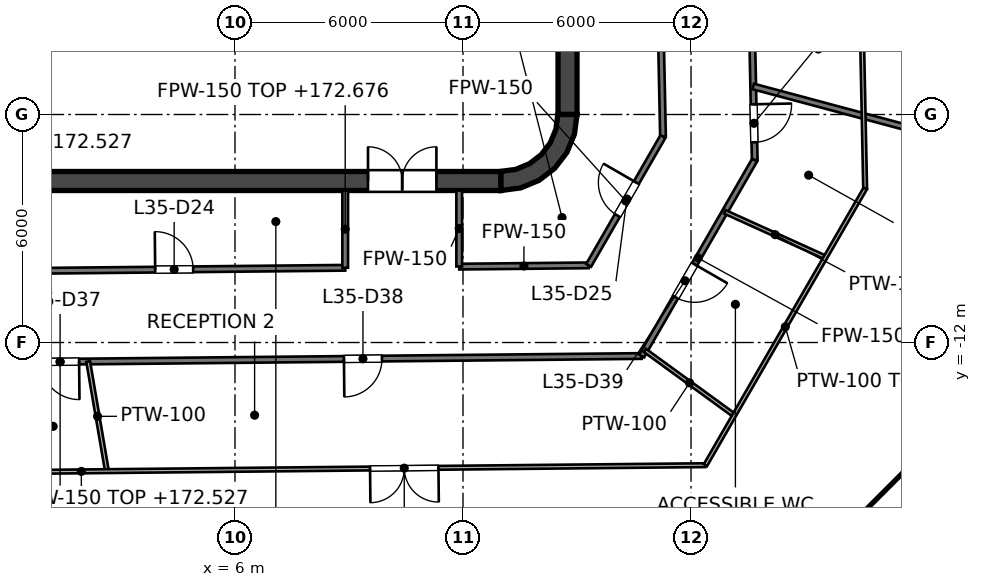
"""IFC4 building model, lengths in metres.
Left out: names, types, materials, properties, quantities, classifications, styles, units other than length and angle.
Written with IfcOpenShell. Run it as: python <this file> out.ifc"""

import sys

from ifc_helpers import new_model, si_unit, direction, frame, frame_2d, origin, place, context, subcontext, project, spatial, polyline, rectangle, outline, extrude, element, fill, save


model = new_model("IFC4")
c1 = context("Model", 3, precision=1e-05, world=origin(), true_north=direction((0.0, 1.0)))
c2 = subcontext(c1, "Body", "Model", "MODEL_VIEW")
j1 = project(units=[si_unit("LENGTHUNIT", "METRE"), si_unit("PLANEANGLEUNIT", "RADIAN")], contexts=[c1])
p1 = place(None, origin())
s1 = spatial("IfcSite", under=j1, at=p1, CompositionType="ELEMENT")
p2 = place(p1, origin())
s2 = spatial("IfcBuilding", under=s1, at=p2, CompositionType="ELEMENT")
p3 = place(p2, frame((0.0, 0.0, 169.6)))
s3 = spatial("IfcBuildingStorey", under=s2, at=p3, CompositionType="ELEMENT", Elevation=169.6)
p4 = place(p3, frame((-13.0, -7.75, 0.0), z_axis=(0.0, 0.0, 1.0), x_axis=(1.0, 0.0, 0.0)))
e1 = element("IfcWall", 1, at=p4, inside=s3, PredefinedType="SHEAR", context=c2, shape_type="SweptSolid", body=[
    extrude(rectangle(XDim=26.0, YDim=0.5, at=frame_2d((13.0, 0.0))), origin(), (0.0, 0.0, 1.0), 4.0),
])
p5 = place(p4, frame((1.7, 0.0, 0.0)))
e2 = element("IfcOpeningElement", 2, at=p5, cuts=e1, PredefinedType="OPENING", context=c2, shape_type="SweptSolid", body=[
    extrude(rectangle(XDim=1.8, YDim=2.1, at=frame_2d((0.9, 1.05))), frame((0.0, 0.25, 0.0), z_axis=(0.0, -1.0, 0.0), x_axis=(1.0, 0.0, 0.0)), (0.0, 0.0, 1.0), 0.5),
])
p6 = place(p4, frame((22.5, 0.0, 0.0)))
e3 = element("IfcOpeningElement", 3, at=p6, cuts=e1, PredefinedType="OPENING", context=c2, shape_type="SweptSolid", body=[
    extrude(rectangle(XDim=1.8, YDim=2.1, at=frame_2d((0.9, 1.05))), frame((0.0, 0.25, 0.0), z_axis=(0.0, -1.0, 0.0), x_axis=(1.0, 0.0, 0.0)), (0.0, 0.0, 1.0), 0.5),
])
p7 = place(p3, frame((14.75, -6.0, 0.0), z_axis=(0.0, 0.0, 1.0), x_axis=(0.0, 1.0, 0.0)))
e4 = element("IfcWall", 4, at=p7, inside=s3, PredefinedType="SHEAR", context=c2, shape_type="SweptSolid", body=[
    extrude(rectangle(XDim=12.0, YDim=0.5, at=frame_2d((6.0, 0.0))), origin(), (0.0, 0.0, 1.0), 4.0),
])
p8 = place(p3, origin())
e5 = element("IfcWall", 5, at=p8, inside=s3, PredefinedType="SHEAR", context=c2, shape_type="SweptSolid", body=[
    extrude(outline(polyline([(15.0, -6.0), (14.496, -6.0), (14.445, -6.387), (14.295, -6.748), (14.058, -7.058), (13.748, -7.295), (13.387, -7.445), (13.0, -7.496), (13.0, -8.0), (13.518, -7.932), (14.0, -7.732), (14.414, -7.414), (14.732, -7.0), (14.932, -6.518), (15.0, -6.0)])), origin(), (0.0, 0.0, 1.0), 4.0),
])
p9 = place(p3, frame((9.0, -6.6, 0.0), z_axis=(0.0, 0.0, 1.0), x_axis=(0.0, 1.0, 0.0)))
e6 = element("IfcWall", 6, at=p9, inside=s3, PredefinedType="SOLIDWALL", context=c2, shape_type="SweptSolid", body=[
    extrude(rectangle(XDim=2.5, YDim=0.25, at=frame_2d((1.25, 0.0))), origin(), (0.0, 0.0, 1.0), 3.85),
])
p10 = place(p9, frame((0.65, 0.0, 0.0)))
e7 = element("IfcOpeningElement", 7, at=p10, cuts=e6, PredefinedType="OPENING", context=c2, shape_type="SweptSolid", body=[
    extrude(rectangle(XDim=1.2, YDim=2.1, at=frame_2d((0.6, 1.05))), frame((0.0, 0.125, 0.0), z_axis=(0.0, -1.0, 0.0), x_axis=(1.0, 0.0, 0.0)), (0.0, 0.0, 1.0), 0.25),
])
p11 = place(p3, frame((3.15, -6.6, 0.0), z_axis=(0.0, 0.0, 1.0), x_axis=(0.0, 1.0, 0.0)))
e8 = element("IfcWall", 8, at=p11, inside=s3, PredefinedType="SOLIDWALL", context=c2, shape_type="SweptSolid", body=[
    extrude(rectangle(XDim=2.5, YDim=0.25, at=frame_2d((1.25, 0.0))), origin(), (0.0, 0.0, 1.0), 3.85),
])
p12 = place(p3, frame((-9.125, -7.05, 0.0), z_axis=(0.0, 0.0, 1.0), x_axis=(1.0, 0.0, 0.0)))
e9 = element("IfcWall", 9, at=p12, inside=s3, PredefinedType="SOLIDWALL", context=c2, shape_type="SweptSolid", body=[
    extrude(rectangle(XDim=18.25, YDim=0.9, at=frame_2d((9.125, 0.0))), origin(), (0.0, 0.0, 1.0), 3.85),
])
p13 = place(p3, frame((11.8, -7.5, 0.0), z_axis=(0.0, 0.0, 1.0), x_axis=(0.0, 1.0, 0.0)))
e10 = element("IfcWall", 10, at=p13, inside=s3, PredefinedType="SOLIDWALL", context=c2, shape_type="SweptSolid", body=[
    extrude(rectangle(XDim=15.0, YDim=0.4, at=frame_2d((7.5, 0.0))), origin(), (0.0, 0.0, 1.0), 3.85),
])
p14 = place(p13, frame((11.3, 0.0, 0.0)))
e11 = element("IfcOpeningElement", 11, at=p14, cuts=e10, PredefinedType="OPENING", context=c2, shape_type="SweptSolid", body=[
    extrude(rectangle(XDim=1.1, YDim=2.1, at=frame_2d((0.55, 1.05))), frame((0.0, 0.2, 0.0), z_axis=(0.0, -1.0, 0.0), x_axis=(1.0, 0.0, 0.0)), (0.0, 0.0, 1.0), 0.4),
])
p15 = place(p13, frame((8.4, 0.0, 0.0)))
e12 = element("IfcOpeningElement", 12, at=p15, cuts=e10, PredefinedType="OPENING", context=c2, shape_type="SweptSolid", body=[
    extrude(rectangle(XDim=1.1, YDim=2.1, at=frame_2d((0.55, 1.05))), frame((0.0, 0.2, 0.0), z_axis=(0.0, -1.0, 0.0), x_axis=(1.0, 0.0, 0.0)), (0.0, 0.0, 1.0), 0.4),
])
p16 = place(p13, frame((5.5, 0.0, 0.0)))
e13 = element("IfcOpeningElement", 13, at=p16, cuts=e10, PredefinedType="OPENING", context=c2, shape_type="SweptSolid", body=[
    extrude(rectangle(XDim=1.1, YDim=2.1, at=frame_2d((0.55, 1.05))), frame((0.0, 0.2, 0.0), z_axis=(0.0, -1.0, 0.0), x_axis=(1.0, 0.0, 0.0)), (0.0, 0.0, 1.0), 0.4),
])
p17 = place(p13, frame((13.697, 0.0, 0.0)))
e14 = element("IfcOpeningElement", 14, at=p17, cuts=e10, PredefinedType="OPENING", context=c2, shape_type="SweptSolid", body=[
    extrude(rectangle(XDim=0.9, YDim=2.1, at=frame_2d((0.45, 1.05))), frame((0.0, 0.2, 0.0), z_axis=(0.0, -1.0, 0.0), x_axis=(1.0, 0.0, 0.0)), (0.0, 0.0, 1.0), 0.4),
])
p18 = place(p13, frame((0.403, 0.0, 0.0)))
e15 = element("IfcOpeningElement", 15, at=p18, cuts=e10, PredefinedType="OPENING", context=c2, shape_type="SweptSolid", body=[
    extrude(rectangle(XDim=0.9, YDim=2.1, at=frame_2d((0.45, 1.05))), frame((0.0, 0.2, 0.0), z_axis=(0.0, -1.0, 0.0), x_axis=(1.0, 0.0, 0.0)), (0.0, 0.0, 1.0), 0.4),
])
e16 = element("IfcWall", 16, at=p8, inside=s3, PredefinedType="SOLIDWALL", context=c2, shape_type="SweptSolid", body=[
    extrude(outline(polyline([(12.0, -5.675), (12.0, -5.925), (14.25, -5.925), (14.5, -5.925), (14.5, -5.675), (14.5, -3.025), (14.5, -2.775), (14.5, -0.125), (14.5, 0.125), (14.5, 2.775), (14.5, 3.025), (14.5, 5.675), (14.5, 5.925), (14.25, 5.925), (12.0, 5.925), (12.0, 5.675), (14.25, 5.675), (14.25, 3.025), (12.0, 3.025), (12.0, 2.775), (14.25, 2.775), (14.25, 0.125), (12.0, 0.125), (12.0, -0.125), (14.25, -0.125), (14.25, -2.775), (12.0, -2.775), (12.0, -3.025), (14.25, -3.025), (14.25, -5.675), (12.0, -5.675)])), origin(), (0.0, 0.0, 1.0), 3.85),
])
p19 = place(p3, frame((16.955, 8.314, 0.0), z_axis=(0.0, 0.0, 1.0), x_axis=(0.020631568882, -0.999787146529, 0.0)))
e17 = element("IfcWall", 17, at=p19, inside=s3, PredefinedType="PARTITIONING", context=c2, shape_type="SweptSolid", body=[
    extrude(rectangle(XDim=14.898, YDim=0.15, at=frame_2d((7.449, 0.0))), origin(), (0.0, 0.0, 1.0), 2.927),
])
p20 = place(p19, frame((6.949, 0.0, 0.0)))
e18 = element("IfcOpeningElement", 18, at=p20, cuts=e17, PredefinedType="OPENING", context=c2, shape_type="SweptSolid", body=[
    extrude(rectangle(XDim=1.0, YDim=2.1, at=frame_2d((0.5, 1.05))), frame((0.0, 0.075, 0.0), z_axis=(0.0, -1.0, 0.0), x_axis=(1.0, 0.0, 0.0)), (0.0, 0.0, 1.0), 0.15),
])
p21 = place(p19, frame((1.514, 0.0, 0.0)))
e19 = element("IfcOpeningElement", 19, at=p21, cuts=e17, PredefinedType="OPENING", context=c2, shape_type="SweptSolid", body=[
    extrude(rectangle(XDim=1.0, YDim=2.1, at=frame_2d((0.5, 1.05))), frame((0.0, 0.075, 0.0), z_axis=(0.0, -1.0, 0.0), x_axis=(1.0, 0.0, 0.0)), (0.0, 0.0, 1.0), 0.15),
])
p22 = place(p3, frame((19.327, 9.716, 0.0), z_axis=(0.0, 0.0, 1.0), x_axis=(0.020632909715, -0.999787118859, 0.0)))
e20 = element("IfcWall", 20, at=p22, inside=s3, PredefinedType="PARTITIONING", context=c2, shape_type="SweptSolid", body=[
    extrude(rectangle(XDim=16.921, YDim=0.15, at=frame_2d((8.46, 0.0))), origin(), (0.0, 0.0, 1.0), 2.927),
])
p23 = place(p22, frame((15.451, 0.0, 0.0)))
e21 = element("IfcOpeningElement", 21, at=p23, cuts=e20, PredefinedType="OPENING", context=c2, shape_type="SweptSolid", body=[
    extrude(rectangle(XDim=1.0, YDim=2.1, at=frame_2d((0.5, 1.05))), frame((0.0, 0.075, 0.0), z_axis=(0.0, -1.0, 0.0), x_axis=(1.0, 0.0, 0.0)), (0.0, 0.0, 1.0), 0.15),
])
p24 = place(p22, frame((12.819, 0.0, 0.0)))
e22 = element("IfcOpeningElement", 22, at=p24, cuts=e20, PredefinedType="OPENING", context=c2, shape_type="SweptSolid", body=[
    extrude(rectangle(XDim=1.0, YDim=2.1, at=frame_2d((0.5, 1.05))), frame((0.0, 0.075, 0.0), z_axis=(0.0, -1.0, 0.0), x_axis=(1.0, 0.0, 0.0)), (0.0, 0.0, 1.0), 0.15),
])
p25 = place(p22, frame((9.226, 0.0, 0.0)))
e23 = element("IfcOpeningElement", 23, at=p25, cuts=e20, PredefinedType="OPENING", context=c2, shape_type="SweptSolid", body=[
    extrude(rectangle(XDim=1.0, YDim=2.1, at=frame_2d((0.5, 1.05))), frame((0.0, 0.075, 0.0), z_axis=(0.0, -1.0, 0.0), x_axis=(1.0, 0.0, 0.0)), (0.0, 0.0, 1.0), 0.15),
])
p26 = place(p22, frame((5.762, 0.0, 0.0)))
e24 = element("IfcOpeningElement", 24, at=p26, cuts=e20, PredefinedType="OPENING", context=c2, shape_type="SweptSolid", body=[
    extrude(rectangle(XDim=1.0, YDim=2.1, at=frame_2d((0.5, 1.05))), frame((0.0, 0.075, 0.0), z_axis=(0.0, -1.0, 0.0), x_axis=(1.0, 0.0, 0.0)), (0.0, 0.0, 1.0), 0.15),
])
p27 = place(p22, frame((1.706, 0.0, 0.0)))
e25 = element("IfcOpeningElement", 25, at=p27, cuts=e20, PredefinedType="OPENING", context=c2, shape_type="SweptSolid", body=[
    extrude(rectangle(XDim=1.0, YDim=2.1, at=frame_2d((0.5, 1.05))), frame((0.0, 0.075, 0.0), z_axis=(0.0, -1.0, 0.0), x_axis=(1.0, 0.0, 0.0)), (0.0, 0.0, 1.0), 0.15),
])
p28 = place(p3, frame((19.636, -5.262, 0.0), z_axis=(0.0, 0.0, 1.0), x_axis=(0.965927163809, -0.258814053357, 0.0)))
e26 = element("IfcWall", 26, at=p28, inside=s3, PredefinedType="PARTITIONING", context=c2, shape_type="SweptSolid", body=[
    extrude(rectangle(XDim=10.174, YDim=0.15, at=frame_2d((5.087, 0.0))), origin(), (0.0, 0.0, 1.0), 3.527),
])
p29 = place(p3, frame((-13.903, -12.657, 0.0), z_axis=(0.0, 0.0, 1.0), x_axis=(0.999951311207, 0.009867888089, 0.0)))
e27 = element("IfcWall", 27, at=p29, inside=s3, PredefinedType="PARTITIONING", context=c2, shape_type="SweptSolid", body=[
    extrude(rectangle(XDim=30.604, YDim=0.15, at=frame_2d((15.302, 0.0))), origin(), (0.0, 0.0, 1.0), 2.927),
])
p30 = place(p29, frame((2.544, 0.0, 0.0)))
e28 = element("IfcOpeningElement", 28, at=p30, cuts=e27, PredefinedType="OPENING", context=c2, shape_type="SweptSolid", body=[
    extrude(rectangle(XDim=1.0, YDim=2.1, at=frame_2d((0.5, 1.05))), frame((0.0, 0.075, 0.0), z_axis=(0.0, -1.0, 0.0), x_axis=(1.0, 0.0, 0.0)), (0.0, 0.0, 1.0), 0.15),
])
p31 = place(p29, frame((9.393, 0.0, 0.0)))
e29 = element("IfcOpeningElement", 29, at=p31, cuts=e27, PredefinedType="OPENING", context=c2, shape_type="SweptSolid", body=[
    extrude(rectangle(XDim=1.0, YDim=2.1, at=frame_2d((0.5, 1.05))), frame((0.0, 0.075, 0.0), z_axis=(0.0, -1.0, 0.0), x_axis=(1.0, 0.0, 0.0)), (0.0, 0.0, 1.0), 0.15),
])
p32 = place(p29, frame((14.802, 0.0, 0.0)))
e30 = element("IfcOpeningElement", 30, at=p32, cuts=e27, PredefinedType="OPENING", context=c2, shape_type="SweptSolid", body=[
    extrude(rectangle(XDim=1.0, YDim=2.1, at=frame_2d((0.5, 1.05))), frame((0.0, 0.075, 0.0), z_axis=(0.0, -1.0, 0.0), x_axis=(1.0, 0.0, 0.0)), (0.0, 0.0, 1.0), 0.15),
])
p33 = place(p29, frame((22.771, 0.0, 0.0)))
e31 = element("IfcOpeningElement", 31, at=p33, cuts=e27, PredefinedType="OPENING", context=c2, shape_type="SweptSolid", body=[
    extrude(rectangle(XDim=1.0, YDim=2.1, at=frame_2d((0.5, 1.05))), frame((0.0, 0.075, 0.0), z_axis=(0.0, -1.0, 0.0), x_axis=(1.0, 0.0, 0.0)), (0.0, 0.0, 1.0), 0.15),
])
p34 = place(p3, frame((-8.404, -10.204, 0.0), z_axis=(0.0, 0.0, 1.0), x_axis=(0.999951372491, 0.009861675993, 0.0)))
e32 = element("IfcWall", 32, at=p34, inside=s3, PredefinedType="PARTITIONING", context=c2, shape_type="SweptSolid", body=[
    extrude(rectangle(XDim=17.305, YDim=0.15, at=frame_2d((8.652, 0.0))), origin(), (0.0, 0.0, 1.0), 2.927),
])
p35 = place(p34, frame((3.702, 0.0, 0.0)))
e33 = element("IfcOpeningElement", 33, at=p35, cuts=e32, PredefinedType="OPENING", context=c2, shape_type="SweptSolid", body=[
    extrude(rectangle(XDim=1.0, YDim=2.1, at=frame_2d((0.5, 1.05))), frame((0.0, 0.075, 0.0), z_axis=(0.0, -1.0, 0.0), x_axis=(1.0, 0.0, 0.0)), (0.0, 0.0, 1.0), 0.15),
])
p36 = place(p34, frame((12.304, 0.0, 0.0)))
e34 = element("IfcOpeningElement", 34, at=p36, cuts=e32, PredefinedType="OPENING", context=c2, shape_type="SweptSolid", body=[
    extrude(rectangle(XDim=1.0, YDim=2.1, at=frame_2d((0.5, 1.05))), frame((0.0, 0.075, 0.0), z_axis=(0.0, -1.0, 0.0), x_axis=(1.0, 0.0, 0.0)), (0.0, 0.0, 1.0), 0.15),
])
p37 = place(p3, frame((11.9, -10.003, 0.0), z_axis=(0.0, 0.0, 1.0), x_axis=(0.999951786456, 0.009819611121, 0.0)))
e35 = element("IfcWall", 35, at=p37, inside=s3, PredefinedType="PARTITIONING", context=c2, shape_type="SweptSolid", body=[
    extrude(rectangle(XDim=3.406, YDim=0.15, at=frame_2d((1.703, 0.0))), origin(), (0.0, 0.0, 1.0), 2.995),
])
p38 = place(p3, frame((16.7, -12.355, 0.0), z_axis=(0.0, 0.0, 1.0), x_axis=(0.499651425435, 0.866226559891, 0.0)))
e36 = element("IfcWall", 36, at=p38, inside=s3, PredefinedType="PARTITIONING", context=c2, shape_type="SweptSolid", body=[
    extrude(rectangle(XDim=5.951, YDim=0.15, at=frame_2d((2.976, 0.0))), origin(), (0.0, 0.0, 1.0), 2.995),
])
p39 = place(p38, frame((1.786, 0.0, 0.0)))
e37 = element("IfcOpeningElement", 37, at=p39, cuts=e36, PredefinedType="OPENING", context=c2, shape_type="SweptSolid", body=[
    extrude(rectangle(XDim=1.0, YDim=2.1, at=frame_2d((0.5, 1.05))), frame((0.0, 0.075, 0.0), z_axis=(0.0, -1.0, 0.0), x_axis=(1.0, 0.0, 0.0)), (0.0, 0.0, 1.0), 0.15),
])
p40 = place(p3, frame((15.306, -9.969, 0.0), z_axis=(0.0, 0.0, 1.0), x_axis=(0.499690037699, 0.866204286658, 0.0)))
e38 = element("IfcWall", 38, at=p40, inside=s3, PredefinedType="PARTITIONING", context=c2, shape_type="SweptSolid", body=[
    extrude(rectangle(XDim=3.912, YDim=0.15, at=frame_2d((1.956, 0.0))), origin(), (0.0, 0.0, 1.0), 2.995),
])
p41 = place(p40, frame((1.513, 0.0, 0.0)))
e39 = element("IfcOpeningElement", 39, at=p41, cuts=e38, PredefinedType="OPENING", context=c2, shape_type="SweptSolid", body=[
    extrude(rectangle(XDim=1.0, YDim=2.1, at=frame_2d((0.5, 1.05))), frame((0.0, 0.075, 0.0), z_axis=(0.0, -1.0, 0.0), x_axis=(1.0, 0.0, 0.0)), (0.0, 0.0, 1.0), 0.15),
])
p42 = place(p3, frame((11.9, -10.0, 0.0), z_axis=(0.0, 0.0, 1.0), x_axis=(0.0, 1.0, 0.0)))
e40 = element("IfcWall", 40, at=p42, inside=s3, PredefinedType="PARTITIONING", context=c2, shape_type="SweptSolid", body=[
    extrude(rectangle(XDim=2.0, YDim=0.15, at=frame_2d((1.0, 0.0))), origin(), (0.0, 0.0, 1.0), 2.995),
])
p43 = place(p3, frame((8.9, -10.033, 0.0), z_axis=(0.0, 0.0, 1.0), x_axis=(0.0, 1.0, 0.0)))
e41 = element("IfcWall", 41, at=p43, inside=s3, PredefinedType="PARTITIONING", context=c2, shape_type="SweptSolid", body=[
    extrude(rectangle(XDim=2.033, YDim=0.15, at=frame_2d((1.017, 0.0))), origin(), (0.0, 0.0, 1.0), 3.076),
])
p44 = place(p3, frame((22.183, 11.404, 0.0), z_axis=(0.0, 0.0, 1.0), x_axis=(0.020584540725, -0.999788115894, 0.0)))
e42 = element("IfcWall", 42, at=p44, inside=s3, PredefinedType="PARTITIONING", context=c2, shape_type="SweptSolid", body=[
    extrude(rectangle(XDim=19.356, YDim=0.1, at=frame_2d((9.678, 0.0))), origin(), (0.0, 0.0, 1.0), 2.927),
])
p45 = place(p44, frame((2.704, 0.0, 0.0)))
e43 = element("IfcOpeningElement", 43, at=p45, cuts=e42, PredefinedType="OPENING", context=c2, shape_type="SweptSolid", body=[
    extrude(rectangle(XDim=1.8, YDim=2.1, at=frame_2d((0.9, 1.05))), frame((0.0, 0.05, 0.0), z_axis=(0.0, -1.0, 0.0), x_axis=(1.0, 0.0, 0.0)), (0.0, 0.0, 1.0), 0.1),
])
p46 = place(p3, frame((2.137, -12.5, 0.0), z_axis=(0.0, 0.0, 1.0), x_axis=(0.16882027801, -0.985646850415, 0.0)))
e44 = element("IfcWall", 44, at=p46, inside=s3, PredefinedType="PARTITIONING", context=c2, shape_type="SweptSolid", body=[
    extrude(rectangle(XDim=2.927, YDim=0.1, at=frame_2d((1.463, 0.0))), origin(), (0.0, 0.0, 1.0), 3.85),
])
p47 = place(p3, frame((16.785, -12.207, 0.0), z_axis=(0.0, 0.0, 1.0), x_axis=(0.808881349984, -0.587971905492, 0.0)))
e45 = element("IfcWall", 45, at=p47, inside=s3, PredefinedType="PARTITIONING", context=c2, shape_type="SweptSolid", body=[
    extrude(rectangle(XDim=2.906, YDim=0.1, at=frame_2d((1.453, 0.0))), origin(), (0.0, 0.0, 1.0), 3.85),
])
p48 = place(p3, frame((18.89, -8.562, 0.0), z_axis=(0.0, 0.0, 1.0), x_axis=(0.910794966467, -0.412858969939, 0.0)))
e46 = element("IfcWall", 46, at=p48, inside=s3, PredefinedType="PARTITIONING", context=c2, shape_type="SweptSolid", body=[
    extrude(rectangle(XDim=2.904, YDim=0.1, at=frame_2d((1.452, 0.0))), origin(), (0.0, 0.0, 1.0), 3.85),
])
p49 = place(p3, frame((-14.464, -15.555, 0.0), z_axis=(0.0, 0.0, 1.0), x_axis=(0.999950390242, 0.009960775811, 0.0)))
e47 = element("IfcWall", 47, at=p49, inside=s3, PredefinedType="PARTITIONING", context=c2, shape_type="SweptSolid", body=[
    extrude(rectangle(XDim=32.844, YDim=0.1, at=frame_2d((16.422, 0.0))), origin(), (0.0, 0.0, 1.0), 2.927),
])
p50 = place(p49, frame((6.333, 0.0, 0.0)))
e48 = element("IfcOpeningElement", 48, at=p50, cuts=e47, PredefinedType="OPENING", context=c2, shape_type="SweptSolid", body=[
    extrude(rectangle(XDim=1.8, YDim=2.1, at=frame_2d((0.9, 1.05))), frame((0.0, 0.05, 0.0), z_axis=(0.0, -1.0, 0.0), x_axis=(1.0, 0.0, 0.0)), (0.0, 0.0, 1.0), 0.1),
])
p51 = place(p49, frame((24.019, 0.0, 0.0)))
e49 = element("IfcOpeningElement", 49, at=p51, cuts=e47, PredefinedType="OPENING", context=c2, shape_type="SweptSolid", body=[
    extrude(rectangle(XDim=1.8, YDim=2.1, at=frame_2d((0.9, 1.05))), frame((0.0, 0.05, 0.0), z_axis=(0.0, -1.0, 0.0), x_axis=(1.0, 0.0, 0.0)), (0.0, 0.0, 1.0), 0.1),
])
p52 = place(p3, frame((18.378, -15.228, 0.0), z_axis=(0.0, 0.0, 1.0), x_axis=(0.50019921462, 0.865910356615, 0.0)))
e50 = element("IfcWall", 50, at=p52, inside=s3, PredefinedType="PARTITIONING", context=c2, shape_type="SweptSolid", body=[
    extrude(rectangle(XDim=8.407, YDim=0.1, at=frame_2d((4.203, 0.0))), origin(), (0.0, 0.0, 1.0), 2.995),
])
p53 = place(p10, origin())
e51 = element("IfcDoor", 51, at=p53, inside=s3, OperationType="SINGLE_SWING_LEFT", PredefinedType="DOOR", context=c2, shape_type="SweptSolid", body=[
    extrude(rectangle(XDim=1.2, YDim=2.1, at=frame_2d((0.6, 1.05))), frame((0.0, 0.025, 0.0), z_axis=(0.0, -1.0, 0.0), x_axis=(1.0, 0.0, 0.0)), (0.0, 0.0, 1.0), 0.05),
])
fill(e7, e51)
p54 = place(p18, origin())
e52 = element("IfcDoor", 52, at=p54, inside=s3, OperationType="SINGLE_SWING_RIGHT", PredefinedType="DOOR", context=c2, shape_type="SweptSolid", body=[
    extrude(rectangle(XDim=0.9, YDim=2.1, at=frame_2d((0.45, 1.05))), frame((0.0, 0.025, 0.0), z_axis=(0.0, -1.0, 0.0), x_axis=(1.0, 0.0, 0.0)), (0.0, 0.0, 1.0), 0.05),
])
fill(e15, e52)
p55 = place(p6, origin())
e53 = element("IfcDoor", 53, at=p55, inside=s3, OperationType="DOUBLE_DOOR_SINGLE_SWING", PredefinedType="DOOR", context=c2, shape_type="SweptSolid", body=[
    extrude(rectangle(XDim=1.8, YDim=2.1, at=frame_2d((0.9, 1.05))), frame((0.0, 0.025, 0.0), z_axis=(0.0, -1.0, 0.0), x_axis=(1.0, 0.0, 0.0)), (0.0, 0.0, 1.0), 0.05),
])
fill(e3, e53)
p56 = place(p36, origin())
e54 = element("IfcDoor", 54, at=p56, inside=s3, OperationType="SINGLE_SWING_LEFT", PredefinedType="DOOR", context=c2, shape_type="SweptSolid", body=[
    extrude(rectangle(XDim=1.0, YDim=2.1, at=frame_2d((0.5, 1.05))), frame((0.0, 0.025, 0.0), z_axis=(0.0, -1.0, 0.0), x_axis=(1.0, 0.0, 0.0)), (0.0, 0.0, 1.0), 0.05),
])
fill(e34, e54)
p57 = place(p41, origin())
e55 = element("IfcDoor", 55, at=p57, inside=s3, OperationType="SINGLE_SWING_RIGHT", PredefinedType="DOOR", context=c2, shape_type="SweptSolid", body=[
    extrude(rectangle(XDim=1.0, YDim=2.1, at=frame_2d((0.5, 1.05))), frame((0.0, 0.025, 0.0), z_axis=(0.0, -1.0, 0.0), x_axis=(1.0, 0.0, 0.0)), (0.0, 0.0, 1.0), 0.05),
])
fill(e39, e55)
p58 = place(p32, origin())
e56 = element("IfcDoor", 56, at=p58, inside=s3, OperationType="SINGLE_SWING_RIGHT", PredefinedType="DOOR", context=c2, shape_type="SweptSolid", body=[
    extrude(rectangle(XDim=1.0, YDim=2.1, at=frame_2d((0.5, 1.05))), frame((0.0, 0.025, 0.0), z_axis=(0.0, -1.0, 0.0), x_axis=(1.0, 0.0, 0.0)), (0.0, 0.0, 1.0), 0.05),
])
fill(e30, e56)
p59 = place(p33, origin())
e57 = element("IfcDoor", 57, at=p59, inside=s3, OperationType="SINGLE_SWING_LEFT", PredefinedType="DOOR", context=c2, shape_type="SweptSolid", body=[
    extrude(rectangle(XDim=1.0, YDim=2.1, at=frame_2d((0.5, 1.05))), frame((0.0, 0.025, 0.0), z_axis=(0.0, -1.0, 0.0), x_axis=(1.0, 0.0, 0.0)), (0.0, 0.0, 1.0), 0.05),
])
fill(e31, e57)
p60 = place(p39, origin())
e58 = element("IfcDoor", 58, at=p60, inside=s3, OperationType="SINGLE_SWING_RIGHT", PredefinedType="DOOR", context=c2, shape_type="SweptSolid", body=[
    extrude(rectangle(XDim=1.0, YDim=2.1, at=frame_2d((0.5, 1.05))), frame((0.0, 0.025, 0.0), z_axis=(0.0, -1.0, 0.0), x_axis=(1.0, 0.0, 0.0)), (0.0, 0.0, 1.0), 0.05),
])
fill(e37, e58)
p61 = place(p23, origin())
e59 = element("IfcDoor", 59, at=p61, inside=s3, OperationType="SINGLE_SWING_LEFT", PredefinedType="DOOR", context=c2, shape_type="SweptSolid", body=[
    extrude(rectangle(XDim=1.0, YDim=2.1, at=frame_2d((0.5, 1.05))), frame((0.0, 0.025, 0.0), z_axis=(0.0, -1.0, 0.0), x_axis=(1.0, 0.0, 0.0)), (0.0, 0.0, 1.0), 0.05),
])
fill(e21, e59)
p62 = place(p51, origin())
e60 = element("IfcDoor", 60, at=p62, inside=s3, OperationType="DOUBLE_DOOR_SINGLE_SWING", PredefinedType="DOOR", context=c2, shape_type="SweptSolid", body=[
    extrude(rectangle(XDim=1.8, YDim=2.1, at=frame_2d((0.9, 1.05))), frame((0.0, 0.025, 0.0), z_axis=(0.0, -1.0, 0.0), x_axis=(1.0, 0.0, 0.0)), (0.0, 0.0, 1.0), 0.05),
])
fill(e49, e60)
save(model, sys.argv[1])
